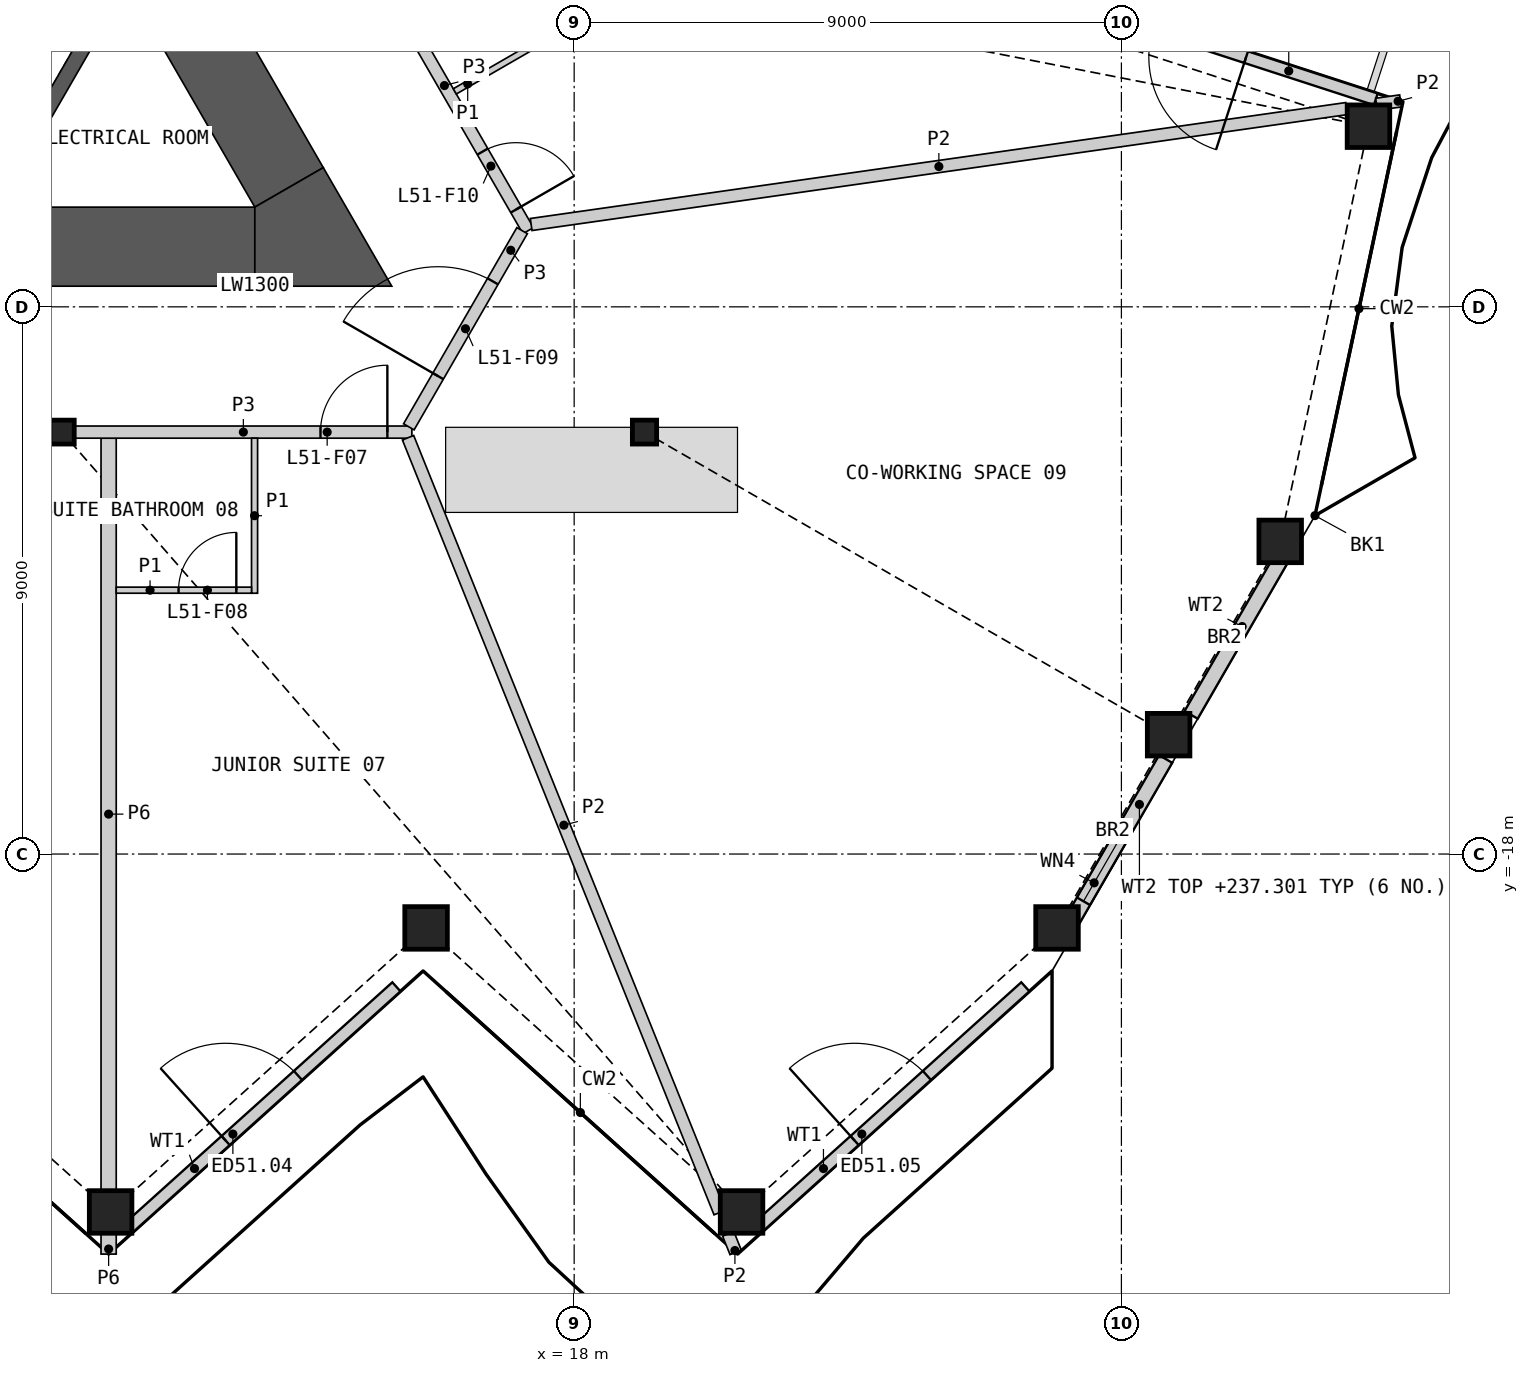
"""IFC4 building model, lengths in metres.
Left out: names, types, materials, properties, quantities, classifications, styles, units other than length and angle.
Written with IfcOpenShell. Run it as: python <this file> out.ifc"""

import sys

from ifc_helpers import new_model, si_unit, direction, frame, frame_2d, origin, origin_2d, place, context, subcontext, project, spatial, polyline, rectangle, hollow_rectangle, i_section, outline, extrude, element, fill, save


model = new_model("IFC4")
c1 = context("Model", 3, precision=1e-05, world=origin(), true_north=direction((0.0, 1.0)))
c2 = subcontext(c1, "Body", "Model", "MODEL_VIEW")
j1 = project(units=[si_unit("LENGTHUNIT", "METRE"), si_unit("PLANEANGLEUNIT", "RADIAN")], contexts=[c1])
p1 = place(None, origin())
s1 = spatial("IfcSite", under=j1, at=p1, CompositionType="ELEMENT")
p2 = place(p1, origin())
s2 = spatial("IfcBuilding", under=s1, at=p2, CompositionType="ELEMENT")
p3 = place(p2, frame((0.0, 0.0, 234.6)))
s3 = spatial("IfcBuildingStorey", under=s2, at=p3, CompositionType="ELEMENT", Elevation=234.6)
for number, where, z_axis, x_axis in (
    (1, (10.376, -23.887, 0.0), (0.0, 0.0, 1.0), (1.0, 0.0, 0.0)),
    (2, (15.565, -19.215, 0.0), (0.0, 0.0, 1.0), (1.0, 0.0, 0.0)),
    (3, (20.753, -23.887, 0.0), (0.0, 0.0, 1.0), (1.0, 0.0, 0.0)),
    (4, (25.941, -19.215, 0.0), (0.0, 0.0, 1.0), (1.0, 0.0, 0.0)),
    (5, (27.776, -16.037, 0.0), (0.0, 0.0, 1.0), (1.0, 0.0, 0.0)),
    (6, (29.612, -12.858, 0.0), (0.0, 0.0, 1.0), (1.0, 0.0, 0.0)),
    (7, (31.063, -6.029, 0.0), (0.0, 0.0, 1.0), (1.0, 0.0, 0.0)),
):
    element("IfcColumn", number, at=place(p3, frame(where, z_axis=z_axis, x_axis=x_axis)), inside=s3, PredefinedType="COLUMN", context=c2, shape_type="SweptSolid", body=[
        extrude(hollow_rectangle(XDim=0.7, YDim=0.7, WallThickness=0.045, at=origin_2d()), origin(), (0.0, 0.0, 1.0), 3.6),
    ])
for number, where, z_axis, x_axis in (
    (8, (9.578, -11.06, 0.0), (0.0, 0.0, 1.0), (1.0, 0.0, 0.0)),
    (9, (19.157, -11.06, 0.0), (0.0, 0.0, 1.0), (1.0, 0.0, 0.0)),
):
    element("IfcColumn", number, at=place(p3, frame(where, z_axis=z_axis, x_axis=x_axis)), inside=s3, PredefinedType="COLUMN", context=c2, shape_type="SweptSolid", body=[
        extrude(i_section(OverallWidth=0.399, OverallDepth=0.393, WebThickness=0.023, FlangeThickness=0.037, at=origin_2d()), origin(), (0.0, 0.0, 1.0), 3.6),
    ])
p4 = place(p3, frame((10.649, -24.17, 0.0), z_axis=(0.0, 0.0, 1.0), x_axis=(0.743143336638, 0.669132259878, 0.0)))
e10 = element("IfcWall", 10, at=p4, inside=s3, PredefinedType="SOLIDWALL", context=c2, shape_type="SweptSolid", body=[
    extrude(rectangle(XDim=5.958, YDim=0.2, at=frame_2d((2.979, 0.0))), origin(), (0.0, 0.0, 1.0), 2.701),
])
p5 = place(p4, frame((2.179, 0.0, 0.0)))
e11 = element("IfcOpeningElement", 11, at=p5, cuts=e10, PredefinedType="OPENING", context=c2, shape_type="SweptSolid", body=[
    extrude(rectangle(XDim=1.6, YDim=2.4, at=frame_2d((0.8, 1.2))), frame((0.0, 0.11, 0.0), z_axis=(0.0, -1.0, 0.0), x_axis=(1.0, 0.0, 0.0)), (0.0, 0.0, 1.0), 0.22),
])
p6 = place(p3, frame((20.993, -24.17, 0.0), z_axis=(0.0, 0.0, 1.0), x_axis=(0.743143336638, 0.669132259878, 0.0)))
e12 = element("IfcWall", 12, at=p6, inside=s3, PredefinedType="SOLIDWALL", context=c2, shape_type="SweptSolid", body=[
    extrude(rectangle(XDim=5.958, YDim=0.2, at=frame_2d((2.979, 0.0))), origin(), (0.0, 0.0, 1.0), 2.701),
])
p7 = place(p6, frame((2.179, 0.0, 0.0)))
e13 = element("IfcOpeningElement", 13, at=p7, cuts=e12, PredefinedType="OPENING", context=c2, shape_type="SweptSolid", body=[
    extrude(rectangle(XDim=1.6, YDim=2.4, at=frame_2d((0.8, 1.2))), frame((0.0, 0.11, 0.0), z_axis=(0.0, -1.0, 0.0), x_axis=(1.0, 0.0, 0.0)), (0.0, 0.0, 1.0), 0.22),
])
p8 = place(p3, frame((26.002, -19.427, 0.0), z_axis=(0.0, 0.0, 1.0), x_axis=(0.499987726745, 0.866032489635, 0.0)))
e14 = element("IfcWall", 14, at=p8, inside=s3, PredefinedType="SOLIDWALL", context=c2, shape_type="SweptSolid", body=[
    extrude(rectangle(XDim=3.452, YDim=0.25, at=frame_2d((1.726, 0.0))), origin(), (0.0, 0.0, 1.0), 2.701),
])
p9 = place(p8, frame((0.75, 0.0, 1.8)))
e15 = element("IfcOpeningElement", 15, at=p9, cuts=e14, PredefinedType="OPENING", context=c2, shape_type="SweptSolid", body=[
    extrude(rectangle(XDim=1.4, YDim=0.7, at=frame_2d((0.7, 0.35))), frame((0.0, 0.135, 0.0), z_axis=(0.0, -1.0, 0.0), x_axis=(1.0, 0.0, 0.0)), (0.0, 0.0, 1.0), 0.27),
])
p10 = place(p3, frame((28.146, -15.712, 0.0), z_axis=(0.0, 0.0, 1.0), x_axis=(0.500003693016, 0.86602327161, 0.0)))
e16 = element("IfcWall", 16, at=p10, inside=s3, PredefinedType="SOLIDWALL", context=c2, shape_type="SweptSolid", body=[
    extrude(rectangle(XDim=3.356, YDim=0.25, at=frame_2d((1.678, 0.0))), origin(), (0.0, 0.0, 1.0), 2.701),
])
p11 = place(p3, frame((31.184, -5.586, 0.0), z_axis=(0.0, 0.0, 1.0), x_axis=(-0.95106415783, 0.30899347516, 0.0)))
e17 = element("IfcWall", 17, at=p11, inside=s3, PredefinedType="SOLIDWALL", context=c2, shape_type="SweptSolid", body=[
    extrude(rectangle(XDim=6.021, YDim=0.2, at=frame_2d((3.011, 0.0))), origin(), (0.0, 0.0, 1.0), 2.701),
])
p12 = place(p11, frame((2.243, 0.0, 0.0)))
e18 = element("IfcOpeningElement", 18, at=p12, cuts=e17, PredefinedType="OPENING", context=c2, shape_type="SweptSolid", body=[
    extrude(rectangle(XDim=1.6, YDim=2.4, at=frame_2d((0.8, 1.2))), frame((0.0, 0.11, 0.0), z_axis=(0.0, -1.0, 0.0), x_axis=(1.0, 0.0, 0.0)), (0.0, 0.0, 1.0), 0.22),
])
p13 = place(p3, origin())
e19 = element("IfcWall", 19, at=p13, inside=s3, PredefinedType="SHEAR", context=c2, shape_type="SweptSolid", body=[
    extrude(outline(polyline([(8.83, -6.881), (10.374, -4.206), (10.032, -4.298), (8.738, -6.539), (8.83, -6.881)])), origin(), (0.0, 0.0, 1.0), 3.25),
])
p14 = place(p3, frame((-12.748, -8.01, 0.0), z_axis=(0.0, 0.0, 1.0), x_axis=(1.0, 0.0, 0.0)))
e20 = element("IfcWall", 20, at=p14, inside=s3, PredefinedType="SHEAR", context=c2, shape_type="SweptSolid", body=[
    extrude(rectangle(XDim=25.497, YDim=1.3, at=frame_2d((12.748, 0.0))), origin(), (0.0, 0.0, 1.0), 3.25),
])
p15 = place(p3, frame((13.311, -7.035, 0.0), z_axis=(0.0, 0.0, 1.0), x_axis=(-0.500003555838, 0.866023350811, 0.0)))
e21 = element("IfcWall", 21, at=p15, inside=s3, PredefinedType="SHEAR", context=c2, shape_type="SweptSolid", body=[
    extrude(rectangle(XDim=4.26, YDim=1.3, at=frame_2d((2.13, 0.0))), origin(), (0.0, 0.0, 1.0), 3.25),
])
p16 = place(p3, origin())
e22 = element("IfcWall", 22, at=p16, inside=s3, PredefinedType="SHEAR", context=c2, shape_type="SweptSolid", body=[
    extrude(outline(polyline([(12.748, -8.66), (12.748, -7.36), (13.874, -6.71), (15.0, -8.66), (12.748, -8.66)])), origin(), (0.0, 0.0, 1.0), 3.25),
])
p17 = place(p3, frame((10.344, -23.527, 0.0), z_axis=(0.0, 0.0, 1.0), x_axis=(0.0, 1.0, 0.0)))
e23 = element("IfcWall", 23, at=p17, inside=s3, PredefinedType="PARTITIONING", context=c2, shape_type="SweptSolid", body=[
    extrude(rectangle(XDim=12.366, YDim=0.25, at=frame_2d((6.183, 0.0))), origin(), (0.0, 0.0, 1.0), 2.404),
])
p18 = place(p3, frame((9.788, -11.06, 0.0), z_axis=(0.0, 0.0, 1.0), x_axis=(1.0, 0.0, 0.0)))
e24 = element("IfcWall", 24, at=p18, inside=s3, PredefinedType="PARTITIONING", context=c2, shape_type="SweptSolid", body=[
    extrude(rectangle(XDim=5.543, YDim=0.2, at=frame_2d((2.771, 0.0))), origin(), (0.0, 0.0, 1.0), 3.25),
])
p19 = place(p18, frame((4.04, 0.0, 0.0)))
e25 = element("IfcOpeningElement", 25, at=p19, cuts=e24, PredefinedType="OPENING", context=c2, shape_type="SweptSolid", body=[
    extrude(rectangle(XDim=1.1, YDim=2.1, at=frame_2d((0.55, 1.05))), frame((0.0, 0.11, 0.0), z_axis=(0.0, -1.0, 0.0), x_axis=(1.0, 0.0, 0.0)), (0.0, 0.0, 1.0), 0.22),
])
p20 = place(p3, frame((14.489, -2.975, 0.0), z_axis=(0.0, 0.0, 1.0), x_axis=(0.500017753321, -0.866015153657, 0.0)))
e26 = element("IfcWall", 26, at=p20, inside=s3, PredefinedType="PARTITIONING", context=c2, shape_type="SweptSolid", body=[
    extrude(rectangle(XDim=5.51, YDim=0.2, at=frame_2d((2.755, 0.0))), origin(), (0.0, 0.0, 1.0), 3.25),
])
p21 = place(p20, frame((4.01, 0.0, 0.0)))
e27 = element("IfcOpeningElement", 27, at=p21, cuts=e26, PredefinedType="OPENING", context=c2, shape_type="SweptSolid", body=[
    extrude(rectangle(XDim=1.1, YDim=2.1, at=frame_2d((0.55, 1.05))), frame((0.0, 0.11, 0.0), z_axis=(0.0, -1.0, 0.0), x_axis=(1.0, 0.0, 0.0)), (0.0, 0.0, 1.0), 0.22),
])
p22 = place(p3, frame((15.281, -10.974, 0.0), z_axis=(0.0, 0.0, 1.0), x_axis=(0.499958791762, 0.866049194065, 0.0)))
e28 = element("IfcWall", 28, at=p22, inside=s3, PredefinedType="PARTITIONING", context=c2, shape_type="SweptSolid", body=[
    extrude(rectangle(XDim=3.726, YDim=0.2, at=frame_2d((1.863, 0.0))), origin(), (0.0, 0.0, 1.0), 3.25),
])
p23 = place(p22, frame((0.963, 0.0, 0.0)))
e29 = element("IfcOpeningElement", 29, at=p23, cuts=e28, PredefinedType="OPENING", context=c2, shape_type="SweptSolid", body=[
    extrude(rectangle(XDim=1.8, YDim=2.1, at=frame_2d((0.9, 1.05))), frame((0.0, 0.11, 0.0), z_axis=(0.0, -1.0, 0.0), x_axis=(1.0, 0.0, 0.0)), (0.0, 0.0, 1.0), 0.22),
])
p24 = place(p3, frame((10.344, -24.58, 0.0), z_axis=(0.0, 0.0, 1.0), x_axis=(0.0, 1.0, 0.0)))
e30 = element("IfcWall", 30, at=p24, inside=s3, PredefinedType="PARTITIONING", context=c2, shape_type="SweptSolid", body=[
    extrude(rectangle(XDim=0.333, YDim=0.25, at=frame_2d((0.167, 0.0))), origin(), (0.0, 0.0, 1.0), 2.404),
])
p25 = place(p3, frame((15.268, -11.153, 0.0), z_axis=(0.0, 0.0, 1.0), x_axis=(0.373096979113, -0.927792349708, 0.0)))
e31 = element("IfcWall", 31, at=p25, inside=s3, PredefinedType="PARTITIONING", context=c2, shape_type="SweptSolid", body=[
    extrude(rectangle(XDim=13.736, YDim=0.2, at=frame_2d((6.868, 0.0))), origin(), (0.0, 0.0, 1.0), 2.404),
])
p26 = place(p3, frame((17.293, -7.646, 0.0), z_axis=(0.0, 0.0, 1.0), x_axis=(0.990042285303, 0.140770285614, 0.0)))
e32 = element("IfcWall", 32, at=p26, inside=s3, PredefinedType="PARTITIONING", context=c2, shape_type="SweptSolid", body=[
    extrude(rectangle(XDim=13.545, YDim=0.2, at=frame_2d((6.772, 0.0))), origin(), (0.0, 0.0, 1.0), 2.404),
])
p27 = place(p3, frame((31.196, -5.669, 0.0), z_axis=(0.0, 0.0, 1.0), x_axis=(0.990010701632, 0.140992236146, 0.0)))
e33 = element("IfcWall", 33, at=p27, inside=s3, PredefinedType="PARTITIONING", context=c2, shape_type="SweptSolid", body=[
    extrude(rectangle(XDim=0.398, YDim=0.2, at=frame_2d((0.199, 0.0))), origin(), (0.0, 0.0, 1.0), 2.404),
])
p28 = place(p3, frame((20.534, -24.247, 0.0), z_axis=(0.0, 0.0, 1.0), x_axis=(0.372801499492, -0.927911117498, 0.0)))
e34 = element("IfcWall", 34, at=p28, inside=s3, PredefinedType="PARTITIONING", context=c2, shape_type="SweptSolid", body=[
    extrude(rectangle(XDim=0.328, YDim=0.2, at=frame_2d((0.164, 0.0))), origin(), (0.0, 0.0, 1.0), 2.404),
])
p29 = place(p3, frame((16.037, -5.456, 0.0), z_axis=(0.0, 0.0, 1.0), x_axis=(0.865989751695, 0.500061746146, 0.0)))
e35 = element("IfcWall", 35, at=p29, inside=s3, PredefinedType="PARTITIONING", context=c2, shape_type="SweptSolid", body=[
    extrude(rectangle(XDim=2.45, YDim=0.1, at=frame_2d((1.225, 0.0))), origin(), (0.0, 0.0, 1.0), 2.404),
])
p30 = place(p3, frame((12.744, -13.71, 0.0), z_axis=(0.0, 0.0, 1.0), x_axis=(0.0, 1.0, 0.0)))
e36 = element("IfcWall", 36, at=p30, inside=s3, PredefinedType="PARTITIONING", context=c2, shape_type="SweptSolid", body=[
    extrude(rectangle(XDim=2.55, YDim=0.1, at=frame_2d((1.275, 0.0))), origin(), (0.0, 0.0, 1.0), 2.404),
])
p31 = place(p3, frame((10.469, -13.66, 0.0), z_axis=(0.0, 0.0, 1.0), x_axis=(1.0, 0.0, 0.0)))
e37 = element("IfcWall", 37, at=p31, inside=s3, PredefinedType="PARTITIONING", context=c2, shape_type="SweptSolid", body=[
    extrude(rectangle(XDim=2.225, YDim=0.1, at=frame_2d((1.113, 0.0))), origin(), (0.0, 0.0, 1.0), 2.404),
])
p32 = place(p31, frame((1.025, 0.0, 0.0)))
e38 = element("IfcOpeningElement", 38, at=p32, cuts=e37, PredefinedType="OPENING", context=c2, shape_type="SweptSolid", body=[
    extrude(rectangle(XDim=0.95, YDim=2.1, at=frame_2d((0.475, 1.05))), frame((0.0, 0.06, 0.0), z_axis=(0.0, -1.0, 0.0), x_axis=(1.0, 0.0, 0.0)), (0.0, 0.0, 1.0), 0.12),
])
p33 = place(p5, origin())
e39 = element("IfcDoor", 39, at=p33, inside=s3, OperationType="DOUBLE_DOOR_SINGLE_SWING", PredefinedType="DOOR", context=c2, shape_type="SweptSolid", body=[
    extrude(rectangle(XDim=1.6, YDim=2.4, at=frame_2d((0.8, 1.2))), frame((0.0, 0.025, 0.0), z_axis=(0.0, -1.0, 0.0), x_axis=(1.0, 0.0, 0.0)), (0.0, 0.0, 1.0), 0.05),
])
fill(e11, e39)
p34 = place(p7, origin())
e40 = element("IfcDoor", 40, at=p34, inside=s3, OperationType="DOUBLE_DOOR_SINGLE_SWING", PredefinedType="DOOR", context=c2, shape_type="SweptSolid", body=[
    extrude(rectangle(XDim=1.6, YDim=2.4, at=frame_2d((0.8, 1.2))), frame((0.0, 0.025, 0.0), z_axis=(0.0, -1.0, 0.0), x_axis=(1.0, 0.0, 0.0)), (0.0, 0.0, 1.0), 0.05),
])
fill(e13, e40)
p35 = place(p9, origin())
e41 = element("IfcWindow", 41, at=p35, inside=s3, PartitioningType="SINGLE_PANEL", PredefinedType="WINDOW", context=c2, shape_type="SweptSolid", body=[
    extrude(rectangle(XDim=1.4, YDim=0.7, at=frame_2d((0.7, 0.35))), frame((0.0, 0.03, 0.0), z_axis=(0.0, -1.0, 0.0), x_axis=(1.0, 0.0, 0.0)), (0.0, 0.0, 1.0), 0.06),
])
fill(e15, e41)
p36 = place(p12, origin())
e42 = element("IfcDoor", 42, at=p36, inside=s3, OperationType="DOUBLE_DOOR_SINGLE_SWING", PredefinedType="DOOR", context=c2, shape_type="SweptSolid", body=[
    extrude(rectangle(XDim=1.6, YDim=2.4, at=frame_2d((0.8, 1.2))), frame((0.0, 0.025, 0.0), z_axis=(0.0, -1.0, 0.0), x_axis=(1.0, 0.0, 0.0)), (0.0, 0.0, 1.0), 0.05),
])
fill(e18, e42)
p37 = place(p19, origin())
e43 = element("IfcDoor", 43, at=p37, inside=s3, OperationType="SINGLE_SWING_RIGHT", PredefinedType="DOOR", context=c2, shape_type="SweptSolid", body=[
    extrude(rectangle(XDim=1.1, YDim=2.1, at=frame_2d((0.55, 1.05))), frame((0.0, 0.025, 0.0), z_axis=(0.0, -1.0, 0.0), x_axis=(1.0, 0.0, 0.0)), (0.0, 0.0, 1.0), 0.05),
])
fill(e25, e43)
p38 = place(p32, origin())
e44 = element("IfcDoor", 44, at=p38, inside=s3, OperationType="SINGLE_SWING_RIGHT", PredefinedType="DOOR", context=c2, shape_type="SweptSolid", body=[
    extrude(rectangle(XDim=0.95, YDim=2.1, at=frame_2d((0.475, 1.05))), frame((0.0, 0.025, 0.0), z_axis=(0.0, -1.0, 0.0), x_axis=(1.0, 0.0, 0.0)), (0.0, 0.0, 1.0), 0.05),
])
fill(e38, e44)
p39 = place(p23, origin())
e45 = element("IfcDoor", 45, at=p39, inside=s3, OperationType="DOUBLE_DOOR_SINGLE_SWING", PredefinedType="DOOR", context=c2, shape_type="SweptSolid", body=[
    extrude(rectangle(XDim=1.8, YDim=2.1, at=frame_2d((0.9, 1.05))), frame((0.0, 0.025, 0.0), z_axis=(0.0, -1.0, 0.0), x_axis=(1.0, 0.0, 0.0)), (0.0, 0.0, 1.0), 0.05),
])
fill(e29, e45)
p40 = place(p21, origin())
e46 = element("IfcDoor", 46, at=p40, inside=s3, OperationType="SINGLE_SWING_RIGHT", PredefinedType="DOOR", context=c2, shape_type="SweptSolid", body=[
    extrude(rectangle(XDim=1.1, YDim=2.1, at=frame_2d((0.55, 1.05))), frame((0.0, 0.025, 0.0), z_axis=(0.0, -1.0, 0.0), x_axis=(1.0, 0.0, 0.0)), (0.0, 0.0, 1.0), 0.05),
])
fill(e27, e46)
save(model, sys.argv[1])
